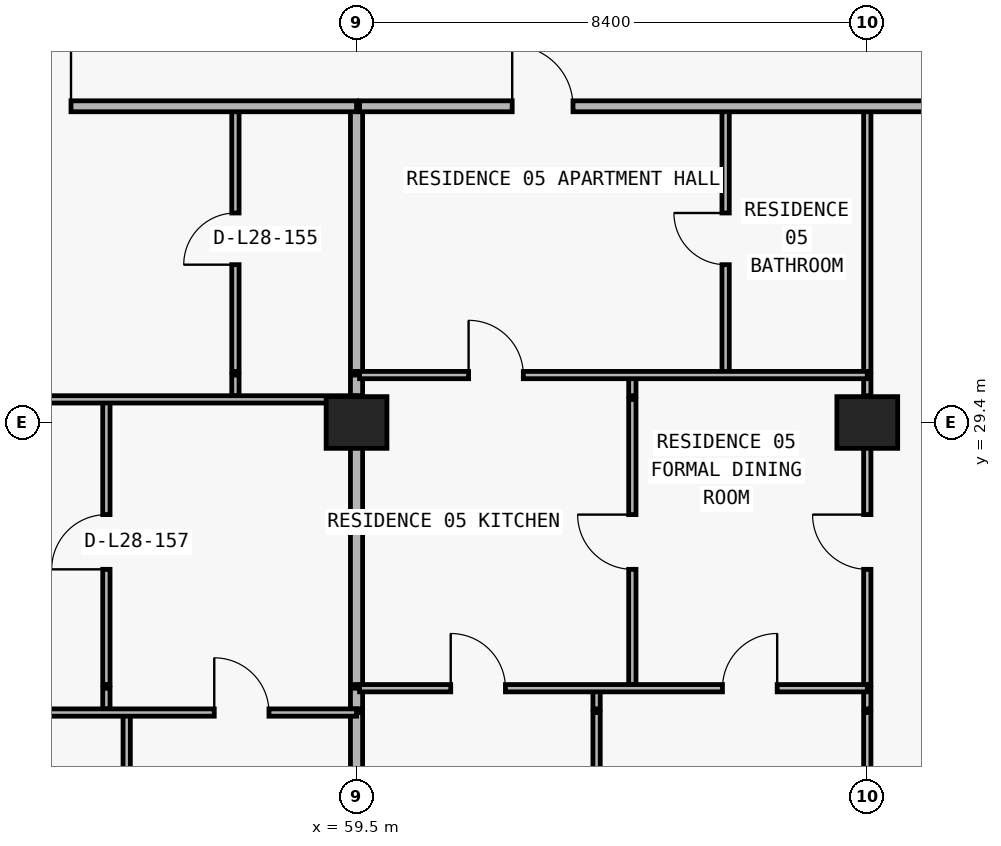
"""IFC4 building model, lengths in metres.
Left out: names, types, materials, properties, quantities, classifications, styles, units other than length and angle.
Written with IfcOpenShell. Run it as: python <this file> out.ifc"""

import sys

from ifc_helpers import new_model, si_unit, direction, frame, frame_2d, origin, origin_2d, place, context, subcontext, project, spatial, rectangle, extrude, element, fill, save


model = new_model("IFC4")
c1 = context("Model", 3, precision=1e-05, world=origin(), true_north=direction((0.0, 1.0)))
c2 = subcontext(c1, "Body", "Model", "MODEL_VIEW")
j1 = project(units=[si_unit("LENGTHUNIT", "METRE"), si_unit("PLANEANGLEUNIT", "RADIAN")], contexts=[c1])
p1 = place(None, origin())
s1 = spatial("IfcSite", under=j1, at=p1, CompositionType="ELEMENT")
p2 = place(p1, origin())
s2 = spatial("IfcBuilding", under=s1, at=p2, CompositionType="ELEMENT")
p3 = place(p2, frame((0.0, 0.0, 105.9)))
s3 = spatial("IfcBuildingStorey", under=s2, at=p3, CompositionType="ELEMENT", Elevation=105.9)
for number, where, z_axis, x_axis in (
    (1, (59.5, 29.4, 0.0), (0.0, 0.0, 1.0), (1.0, 0.0, 0.0)),
    (2, (67.9, 29.4, 0.0), (0.0, 0.0, 1.0), (1.0, 0.0, 0.0)),
):
    element("IfcColumn", number, at=place(p3, frame(where, z_axis=z_axis, x_axis=x_axis)), inside=s3, PredefinedType="COLUMN", context=c2, shape_type="SweptSolid", body=[
        extrude(rectangle(XDim=1.0, YDim=0.85, at=origin_2d()), origin(), (0.0, 0.0, 1.0), 3.05),
    ])
p4 = place(p3, frame((55.386, 24.69, 0.0), z_axis=(0.0, 0.0, 1.0), x_axis=(0.0, 1.0, 0.0)))
e3 = element("IfcWall", 3, at=p4, inside=s3, PredefinedType="PARTITIONING", context=c2, shape_type="SweptSolid", body=[
    extrude(rectangle(XDim=0.34, YDim=0.12, at=frame_2d((0.17, 0.0))), origin(), (0.0, 0.0, 1.0), 3.05),
])
p5 = place(p3, frame((55.386, 25.09, 0.0), z_axis=(0.0, 0.0, 1.0), x_axis=(0.0, 1.0, 0.0)))
e4 = element("IfcWall", 4, at=p5, inside=s3, PredefinedType="PARTITIONING", context=c2, shape_type="SweptSolid", body=[
    extrude(rectangle(XDim=4.69, YDim=0.12, at=frame_2d((2.345, 0.0))), origin(), (0.0, 0.0, 1.0), 2.725),
])
p6 = place(p5, frame((1.895, 0.0, 0.0)))
e5 = element("IfcOpeningElement", 5, at=p6, cuts=e4, PredefinedType="OPENING", context=c2, shape_type="SweptSolid", body=[
    extrude(rectangle(XDim=0.9, YDim=2.15, at=frame_2d((0.45, 1.075))), frame((0.0, 0.07, 0.0), z_axis=(0.0, -1.0, 0.0), x_axis=(1.0, 0.0, 0.0)), (0.0, 0.0, 1.0), 0.14),
])
p7 = place(p3, frame((55.72, 8.84, 0.0), z_axis=(0.0, 0.0, 1.0), x_axis=(0.0, 1.0, 0.0)))
e6 = element("IfcWall", 6, at=p7, inside=s3, PredefinedType="PARTITIONING", context=c2, shape_type="SweptSolid", body=[
    extrude(rectangle(XDim=15.79, YDim=0.12, at=frame_2d((7.895, 0.0))), origin(), (0.0, 0.0, 1.0), 3.05),
])
p8 = place(p3, frame((57.508, 29.84, 0.0), z_axis=(0.0, 0.0, 1.0), x_axis=(0.0, 1.0, 0.0)))
e7 = element("IfcWall", 7, at=p8, inside=s3, PredefinedType="PARTITIONING", context=c2, shape_type="SweptSolid", body=[
    extrude(rectangle(XDim=0.34, YDim=0.12, at=frame_2d((0.17, 0.0))), origin(), (0.0, 0.0, 1.0), 3.05),
])
p9 = place(p3, frame((57.508, 30.24, 0.0), z_axis=(0.0, 0.0, 1.0), x_axis=(0.0, 1.0, 0.0)))
e8 = element("IfcWall", 8, at=p9, inside=s3, PredefinedType="PARTITIONING", context=c2, shape_type="SweptSolid", body=[
    extrude(rectangle(XDim=4.36, YDim=0.12, at=frame_2d((2.18, 0.0))), origin(), (0.0, 0.0, 1.0), 3.05),
])
p10 = place(p9, frame((1.755, 0.0, 0.0)))
e9 = element("IfcOpeningElement", 9, at=p10, cuts=e8, PredefinedType="OPENING", context=c2, shape_type="SweptSolid", body=[
    extrude(rectangle(XDim=0.85, YDim=2.1, at=frame_2d((0.425, 1.05))), frame((0.0, 0.07, 0.0), z_axis=(0.0, -1.0, 0.0), x_axis=(1.0, 0.0, 0.0)), (0.0, 0.0, 1.0), 0.14),
])
p11 = place(p3, frame((59.5, 8.84, 0.0), z_axis=(0.0, 0.0, 1.0), x_axis=(0.0, 1.0, 0.0)))
e10 = element("IfcWall", 10, at=p11, inside=s3, PredefinedType="PARTITIONING", context=c2, shape_type="SweptSolid", body=[
    extrude(rectangle(XDim=15.79, YDim=0.2, at=frame_2d((7.895, 0.0))), origin(), (0.0, 0.0, 1.0), 2.174),
])
p12 = place(p3, frame((59.5, 24.69, 0.0), z_axis=(0.0, 0.0, 1.0), x_axis=(0.0, 1.0, 0.0)))
e11 = element("IfcWall", 11, at=p12, inside=s3, PredefinedType="PARTITIONING", context=c2, shape_type="SweptSolid", body=[
    extrude(rectangle(XDim=0.34, YDim=0.2, at=frame_2d((0.17, 0.0))), origin(), (0.0, 0.0, 1.0), 2.174),
])
p13 = place(p3, frame((59.5, 25.09, 0.0), z_axis=(0.0, 0.0, 1.0), x_axis=(0.0, 1.0, 0.0)))
e12 = element("IfcWall", 12, at=p13, inside=s3, PredefinedType="PARTITIONING", context=c2, shape_type="SweptSolid", body=[
    extrude(rectangle(XDim=4.69, YDim=0.2, at=frame_2d((2.345, 0.0))), origin(), (0.0, 0.0, 1.0), 2.174),
])
p14 = place(p3, frame((59.5, 29.84, 0.0), z_axis=(0.0, 0.0, 1.0), x_axis=(0.0, 1.0, 0.0)))
e13 = element("IfcWall", 13, at=p14, inside=s3, PredefinedType="PARTITIONING", context=c2, shape_type="SweptSolid", body=[
    extrude(rectangle(XDim=0.34, YDim=0.2, at=frame_2d((0.17, 0.0))), origin(), (0.0, 0.0, 1.0), 2.174),
])
p15 = place(p3, frame((59.5, 30.24, 0.0), z_axis=(0.0, 0.0, 1.0), x_axis=(0.0, 1.0, 0.0)))
e14 = element("IfcWall", 14, at=p15, inside=s3, PredefinedType="PARTITIONING", context=c2, shape_type="SweptSolid", body=[
    extrude(rectangle(XDim=4.36, YDim=0.2, at=frame_2d((2.18, 0.0))), origin(), (0.0, 0.0, 1.0), 2.174),
])
p16 = place(p3, frame((63.448, 8.84, 0.0), z_axis=(0.0, 0.0, 1.0), x_axis=(0.0, 1.0, 0.0)))
e15 = element("IfcWall", 15, at=p16, inside=s3, PredefinedType="PARTITIONING", context=c2, shape_type="SweptSolid", body=[
    extrude(rectangle(XDim=15.79, YDim=0.12, at=frame_2d((7.895, 0.0))), origin(), (0.0, 0.0, 1.0), 3.05),
])
p17 = place(p3, frame((63.448, 24.69, 0.0), z_axis=(0.0, 0.0, 1.0), x_axis=(0.0, 1.0, 0.0)))
e16 = element("IfcWall", 16, at=p17, inside=s3, PredefinedType="PARTITIONING", context=c2, shape_type="SweptSolid", body=[
    extrude(rectangle(XDim=0.34, YDim=0.12, at=frame_2d((0.17, 0.0))), origin(), (0.0, 0.0, 1.0), 3.05),
])
p18 = place(p3, frame((64.036, 25.09, 0.0), z_axis=(0.0, 0.0, 1.0), x_axis=(0.0, 1.0, 0.0)))
e17 = element("IfcWall", 17, at=p18, inside=s3, PredefinedType="PARTITIONING", context=c2, shape_type="SweptSolid", body=[
    extrude(rectangle(XDim=4.69, YDim=0.12, at=frame_2d((2.345, 0.0))), origin(), (0.0, 0.0, 1.0), 3.05),
])
p19 = place(p18, frame((1.895, 0.0, 0.0)))
e18 = element("IfcOpeningElement", 18, at=p19, cuts=e17, PredefinedType="OPENING", context=c2, shape_type="SweptSolid", body=[
    extrude(rectangle(XDim=0.9, YDim=2.15, at=frame_2d((0.45, 1.075))), frame((0.0, 0.07, 0.0), z_axis=(0.0, -1.0, 0.0), x_axis=(1.0, 0.0, 0.0)), (0.0, 0.0, 1.0), 0.14),
])
p20 = place(p3, frame((64.036, 29.84, 0.0), z_axis=(0.0, 0.0, 1.0), x_axis=(0.0, 1.0, 0.0)))
e19 = element("IfcWall", 19, at=p20, inside=s3, PredefinedType="PARTITIONING", context=c2, shape_type="SweptSolid", body=[
    extrude(rectangle(XDim=0.34, YDim=0.12, at=frame_2d((0.17, 0.0))), origin(), (0.0, 0.0, 1.0), 3.05),
])
p21 = place(p3, frame((65.57, 30.24, 0.0), z_axis=(0.0, 0.0, 1.0), x_axis=(0.0, 1.0, 0.0)))
e20 = element("IfcWall", 20, at=p21, inside=s3, PredefinedType="PARTITIONING", context=c2, shape_type="SweptSolid", body=[
    extrude(rectangle(XDim=4.36, YDim=0.12, at=frame_2d((2.18, 0.0))), origin(), (0.0, 0.0, 1.0), 3.05),
])
p22 = place(p21, frame((1.755, 0.0, 0.0)))
e21 = element("IfcOpeningElement", 21, at=p22, cuts=e20, PredefinedType="OPENING", context=c2, shape_type="SweptSolid", body=[
    extrude(rectangle(XDim=0.85, YDim=2.1, at=frame_2d((0.425, 1.05))), frame((0.0, 0.07, 0.0), z_axis=(0.0, -1.0, 0.0), x_axis=(1.0, 0.0, 0.0)), (0.0, 0.0, 1.0), 0.14),
])
p23 = place(p3, frame((67.9, 8.84, 0.0), z_axis=(0.0, 0.0, 1.0), x_axis=(0.0, 1.0, 0.0)))
e22 = element("IfcWall", 22, at=p23, inside=s3, PredefinedType="PARTITIONING", context=c2, shape_type="SweptSolid", body=[
    extrude(rectangle(XDim=15.79, YDim=0.12, at=frame_2d((7.895, 0.0))), origin(), (0.0, 0.0, 1.0), 2.174),
])
p24 = place(p3, frame((67.9, 24.69, 0.0), z_axis=(0.0, 0.0, 1.0), x_axis=(0.0, 1.0, 0.0)))
e23 = element("IfcWall", 23, at=p24, inside=s3, PredefinedType="PARTITIONING", context=c2, shape_type="SweptSolid", body=[
    extrude(rectangle(XDim=0.34, YDim=0.12, at=frame_2d((0.17, 0.0))), origin(), (0.0, 0.0, 1.0), 2.174),
])
p25 = place(p3, frame((67.9, 25.09, 0.0), z_axis=(0.0, 0.0, 1.0), x_axis=(0.0, 1.0, 0.0)))
e24 = element("IfcWall", 24, at=p25, inside=s3, PredefinedType="PARTITIONING", context=c2, shape_type="SweptSolid", body=[
    extrude(rectangle(XDim=4.69, YDim=0.12, at=frame_2d((2.345, 0.0))), origin(), (0.0, 0.0, 1.0), 2.174),
])
p26 = place(p25, frame((1.895, 0.0, 0.0)))
e25 = element("IfcOpeningElement", 25, at=p26, cuts=e24, PredefinedType="OPENING", context=c2, shape_type="SweptSolid", body=[
    extrude(rectangle(XDim=0.9, YDim=2.124, at=frame_2d((0.45, 1.062))), frame((0.0, 0.07, 0.0), z_axis=(0.0, -1.0, 0.0), x_axis=(1.0, 0.0, 0.0)), (0.0, 0.0, 1.0), 0.14),
])
p27 = place(p3, frame((67.9, 29.84, 0.0), z_axis=(0.0, 0.0, 1.0), x_axis=(0.0, 1.0, 0.0)))
e26 = element("IfcWall", 26, at=p27, inside=s3, PredefinedType="PARTITIONING", context=c2, shape_type="SweptSolid", body=[
    extrude(rectangle(XDim=0.34, YDim=0.12, at=frame_2d((0.17, 0.0))), origin(), (0.0, 0.0, 1.0), 2.174),
])
p28 = place(p3, frame((67.9, 30.24, 0.0), z_axis=(0.0, 0.0, 1.0), x_axis=(0.0, 1.0, 0.0)))
e27 = element("IfcWall", 27, at=p28, inside=s3, PredefinedType="PARTITIONING", context=c2, shape_type="SweptSolid", body=[
    extrude(rectangle(XDim=4.36, YDim=0.12, at=frame_2d((2.18, 0.0))), origin(), (0.0, 0.0, 1.0), 2.174),
])
p29 = place(p3, frame((51.32, 24.63, 0.0), z_axis=(0.0, 0.0, 1.0), x_axis=(1.0, 0.0, 0.0)))
e28 = element("IfcWall", 28, at=p29, inside=s3, PredefinedType="PARTITIONING", context=c2, shape_type="SweptSolid", body=[
    extrude(rectangle(XDim=8.18, YDim=0.12, at=frame_2d((4.09, 0.0))), origin(), (0.0, 0.0, 1.0), 3.05),
])
p30 = place(p29, frame((1.583, 0.0, 0.0)))
e29 = element("IfcOpeningElement", 29, at=p30, cuts=e28, PredefinedType="OPENING", context=c2, shape_type="SweptSolid", body=[
    extrude(rectangle(XDim=0.9, YDim=2.15, at=frame_2d((0.45, 1.075))), frame((0.0, 0.07, 0.0), z_axis=(0.0, -1.0, 0.0), x_axis=(1.0, 0.0, 0.0)), (0.0, 0.0, 1.0), 0.14),
])
p31 = place(p29, frame((5.84, 0.0, 0.0)))
e30 = element("IfcOpeningElement", 30, at=p31, cuts=e28, PredefinedType="OPENING", context=c2, shape_type="SweptSolid", body=[
    extrude(rectangle(XDim=0.9, YDim=2.15, at=frame_2d((0.45, 1.075))), frame((0.0, 0.07, 0.0), z_axis=(0.0, -1.0, 0.0), x_axis=(1.0, 0.0, 0.0)), (0.0, 0.0, 1.0), 0.14),
])
p32 = place(p3, frame((59.55, 25.03, 0.0), z_axis=(0.0, 0.0, 1.0), x_axis=(1.0, 0.0, 0.0)))
e31 = element("IfcWall", 31, at=p32, inside=s3, PredefinedType="PARTITIONING", context=c2, shape_type="SweptSolid", body=[
    extrude(rectangle(XDim=8.35, YDim=0.12, at=frame_2d((4.175, 0.0))), origin(), (0.0, 0.0, 1.0), 3.05),
])
p33 = place(p32, frame((1.499, 0.0, 0.0)))
e32 = element("IfcOpeningElement", 32, at=p33, cuts=e31, PredefinedType="OPENING", context=c2, shape_type="SweptSolid", body=[
    extrude(rectangle(XDim=0.9, YDim=2.15, at=frame_2d((0.45, 1.075))), frame((0.0, 0.07, 0.0), z_axis=(0.0, -1.0, 0.0), x_axis=(1.0, 0.0, 0.0)), (0.0, 0.0, 1.0), 0.14),
])
p34 = place(p32, frame((5.968, 0.0, 0.0)))
e33 = element("IfcOpeningElement", 33, at=p34, cuts=e31, PredefinedType="OPENING", context=c2, shape_type="SweptSolid", body=[
    extrude(rectangle(XDim=0.9, YDim=2.15, at=frame_2d((0.45, 1.075))), frame((0.0, 0.07, 0.0), z_axis=(0.0, -1.0, 0.0), x_axis=(1.0, 0.0, 0.0)), (0.0, 0.0, 1.0), 0.14),
])
p35 = place(p3, frame((51.1, 29.78, 0.0), z_axis=(0.0, 0.0, 1.0), x_axis=(1.0, 0.0, 0.0)))
e34 = element("IfcWall", 34, at=p35, inside=s3, PredefinedType="PARTITIONING", context=c2, shape_type="SweptSolid", body=[
    extrude(rectangle(XDim=8.4, YDim=0.12, at=frame_2d((4.2, 0.0))), origin(), (0.0, 0.0, 1.0), 3.05),
])
p36 = place(p35, frame((1.693, 0.0, 0.0)))
e35 = element("IfcOpeningElement", 35, at=p36, cuts=e34, PredefinedType="OPENING", context=c2, shape_type="SweptSolid", body=[
    extrude(rectangle(XDim=0.9, YDim=2.15, at=frame_2d((0.45, 1.075))), frame((0.0, 0.07, 0.0), z_axis=(0.0, -1.0, 0.0), x_axis=(1.0, 0.0, 0.0)), (0.0, 0.0, 1.0), 0.14),
])
p37 = place(p3, frame((59.55, 30.18, 0.0), z_axis=(0.0, 0.0, 1.0), x_axis=(1.0, 0.0, 0.0)))
e36 = element("IfcWall", 36, at=p37, inside=s3, PredefinedType="PARTITIONING", context=c2, shape_type="SweptSolid", body=[
    extrude(rectangle(XDim=8.35, YDim=0.12, at=frame_2d((4.175, 0.0))), origin(), (0.0, 0.0, 1.0), 3.05),
])
p38 = place(p37, frame((1.793, 0.0, 0.0)))
e37 = element("IfcOpeningElement", 37, at=p38, cuts=e36, PredefinedType="OPENING", context=c2, shape_type="SweptSolid", body=[
    extrude(rectangle(XDim=0.9, YDim=2.15, at=frame_2d((0.45, 1.075))), frame((0.0, 0.07, 0.0), z_axis=(0.0, -1.0, 0.0), x_axis=(1.0, 0.0, 0.0)), (0.0, 0.0, 1.0), 0.14),
])
p39 = place(p3, frame((26.7, 34.6, 0.0), z_axis=(0.0, 0.0, 1.0), x_axis=(1.0, 0.0, 0.0)))
e38 = element("IfcWall", 38, at=p39, inside=s3, PredefinedType="PARTITIONING", context=c2, shape_type="SweptSolid", body=[
    extrude(rectangle(XDim=32.8, YDim=0.18, at=frame_2d((16.4, 0.0))), origin(), (0.0, 0.0, 1.0), 3.05),
])
p40 = place(p39, frame((2.812, 0.0, 0.0)))
e39 = element("IfcOpeningElement", 39, at=p40, cuts=e38, PredefinedType="OPENING", context=c2, shape_type="SweptSolid", body=[
    extrude(rectangle(XDim=1.0, YDim=2.2, at=frame_2d((0.5, 1.1))), frame((0.0, 0.1, 0.0), z_axis=(0.0, -1.0, 0.0), x_axis=(1.0, 0.0, 0.0)), (0.0, 0.0, 1.0), 0.2),
])
p41 = place(p39, frame((27.104, 0.0, 0.0)))
e40 = element("IfcOpeningElement", 40, at=p41, cuts=e38, PredefinedType="OPENING", context=c2, shape_type="SweptSolid", body=[
    extrude(rectangle(XDim=1.0, YDim=2.2, at=frame_2d((0.5, 1.1))), frame((0.0, 0.1, 0.0), z_axis=(0.0, -1.0, 0.0), x_axis=(1.0, 0.0, 0.0)), (0.0, 0.0, 1.0), 0.2),
])
p42 = place(p3, frame((59.55, 34.6, 0.0), z_axis=(0.0, 0.0, 1.0), x_axis=(1.0, 0.0, 0.0)))
e41 = element("IfcWall", 41, at=p42, inside=s3, PredefinedType="PARTITIONING", context=c2, shape_type="SweptSolid", body=[
    extrude(rectangle(XDim=10.55, YDim=0.18, at=frame_2d((5.275, 0.0))), origin(), (0.0, 0.0, 1.0), 3.05),
])
p43 = place(p42, frame((2.51, 0.0, 0.0)))
e42 = element("IfcOpeningElement", 42, at=p43, cuts=e41, PredefinedType="OPENING", context=c2, shape_type="SweptSolid", body=[
    extrude(rectangle(XDim=1.0, YDim=2.2, at=frame_2d((0.5, 1.1))), frame((0.0, 0.1, 0.0), z_axis=(0.0, -1.0, 0.0), x_axis=(1.0, 0.0, 0.0)), (0.0, 0.0, 1.0), 0.2),
])
p44 = place(p41, origin())
e43 = element("IfcDoor", 43, at=p44, inside=s3, OperationType="SINGLE_SWING_RIGHT", PredefinedType="DOOR", context=c2, shape_type="SweptSolid", body=[
    extrude(rectangle(XDim=1.0, YDim=2.2, at=frame_2d((0.5, 1.1))), frame((0.0, 0.025, 0.0), z_axis=(0.0, -1.0, 0.0), x_axis=(1.0, 0.0, 0.0)), (0.0, 0.0, 1.0), 0.05),
])
fill(e40, e43)
p45 = place(p10, origin())
e44 = element("IfcDoor", 44, at=p45, inside=s3, OperationType="SINGLE_SWING_LEFT", PredefinedType="DOOR", context=c2, shape_type="SweptSolid", body=[
    extrude(rectangle(XDim=0.85, YDim=2.1, at=frame_2d((0.425, 1.05))), frame((0.0, 0.025, 0.0), z_axis=(0.0, -1.0, 0.0), x_axis=(1.0, 0.0, 0.0)), (0.0, 0.0, 1.0), 0.05),
])
fill(e9, e44)
p46 = place(p6, origin())
e45 = element("IfcDoor", 45, at=p46, inside=s3, OperationType="SINGLE_SWING_LEFT", PredefinedType="DOOR", context=c2, shape_type="SweptSolid", body=[
    extrude(rectangle(XDim=0.9, YDim=2.15, at=frame_2d((0.45, 1.075))), frame((0.0, 0.025, 0.0), z_axis=(0.0, -1.0, 0.0), x_axis=(1.0, 0.0, 0.0)), (0.0, 0.0, 1.0), 0.05),
])
fill(e5, e45)
p47 = place(p31, origin())
e46 = element("IfcDoor", 46, at=p47, inside=s3, OperationType="SINGLE_SWING_LEFT", PredefinedType="DOOR", context=c2, shape_type="SweptSolid", body=[
    extrude(rectangle(XDim=0.9, YDim=2.15, at=frame_2d((0.45, 1.075))), frame((0.0, 0.025, 0.0), z_axis=(0.0, -1.0, 0.0), x_axis=(1.0, 0.0, 0.0)), (0.0, 0.0, 1.0), 0.05),
])
fill(e30, e46)
p48 = place(p43, origin())
e47 = element("IfcDoor", 47, at=p48, inside=s3, OperationType="SINGLE_SWING_LEFT", PredefinedType="DOOR", context=c2, shape_type="SweptSolid", body=[
    extrude(rectangle(XDim=1.0, YDim=2.2, at=frame_2d((0.5, 1.1))), frame((0.0, 0.025, 0.0), z_axis=(0.0, -1.0, 0.0), x_axis=(1.0, 0.0, 0.0)), (0.0, 0.0, 1.0), 0.05),
])
fill(e42, e47)
p49 = place(p22, origin())
e48 = element("IfcDoor", 48, at=p49, inside=s3, OperationType="SINGLE_SWING_RIGHT", PredefinedType="DOOR", context=c2, shape_type="SweptSolid", body=[
    extrude(rectangle(XDim=0.85, YDim=2.1, at=frame_2d((0.425, 1.05))), frame((0.0, 0.025, 0.0), z_axis=(0.0, -1.0, 0.0), x_axis=(1.0, 0.0, 0.0)), (0.0, 0.0, 1.0), 0.05),
])
fill(e21, e48)
p50 = place(p38, origin())
e49 = element("IfcDoor", 49, at=p50, inside=s3, OperationType="SINGLE_SWING_LEFT", PredefinedType="DOOR", context=c2, shape_type="SweptSolid", body=[
    extrude(rectangle(XDim=0.9, YDim=2.15, at=frame_2d((0.45, 1.075))), frame((0.0, 0.025, 0.0), z_axis=(0.0, -1.0, 0.0), x_axis=(1.0, 0.0, 0.0)), (0.0, 0.0, 1.0), 0.05),
])
fill(e37, e49)
p51 = place(p19, origin())
e50 = element("IfcDoor", 50, at=p51, inside=s3, OperationType="SINGLE_SWING_RIGHT", PredefinedType="DOOR", context=c2, shape_type="SweptSolid", body=[
    extrude(rectangle(XDim=0.9, YDim=2.15, at=frame_2d((0.45, 1.075))), frame((0.0, 0.025, 0.0), z_axis=(0.0, -1.0, 0.0), x_axis=(1.0, 0.0, 0.0)), (0.0, 0.0, 1.0), 0.05),
])
fill(e18, e50)
p52 = place(p33, origin())
e51 = element("IfcDoor", 51, at=p52, inside=s3, OperationType="SINGLE_SWING_LEFT", PredefinedType="DOOR", context=c2, shape_type="SweptSolid", body=[
    extrude(rectangle(XDim=0.9, YDim=2.15, at=frame_2d((0.45, 1.075))), frame((0.0, 0.025, 0.0), z_axis=(0.0, -1.0, 0.0), x_axis=(1.0, 0.0, 0.0)), (0.0, 0.0, 1.0), 0.05),
])
fill(e32, e51)
p53 = place(p34, origin())
e52 = element("IfcDoor", 52, at=p53, inside=s3, OperationType="SINGLE_SWING_RIGHT", PredefinedType="DOOR", context=c2, shape_type="SweptSolid", body=[
    extrude(rectangle(XDim=0.9, YDim=2.15, at=frame_2d((0.45, 1.075))), frame((0.0, 0.025, 0.0), z_axis=(0.0, -1.0, 0.0), x_axis=(1.0, 0.0, 0.0)), (0.0, 0.0, 1.0), 0.05),
])
fill(e33, e52)
p54 = place(p26, origin())
e53 = element("IfcDoor", 53, at=p54, inside=s3, OperationType="SINGLE_SWING_RIGHT", PredefinedType="DOOR", context=c2, shape_type="SweptSolid", body=[
    extrude(rectangle(XDim=0.9, YDim=2.124, at=frame_2d((0.45, 1.062))), frame((0.0, 0.025, 0.0), z_axis=(0.0, -1.0, 0.0), x_axis=(1.0, 0.0, 0.0)), (0.0, 0.0, 1.0), 0.05),
])
fill(e25, e53)
save(model, sys.argv[1])
